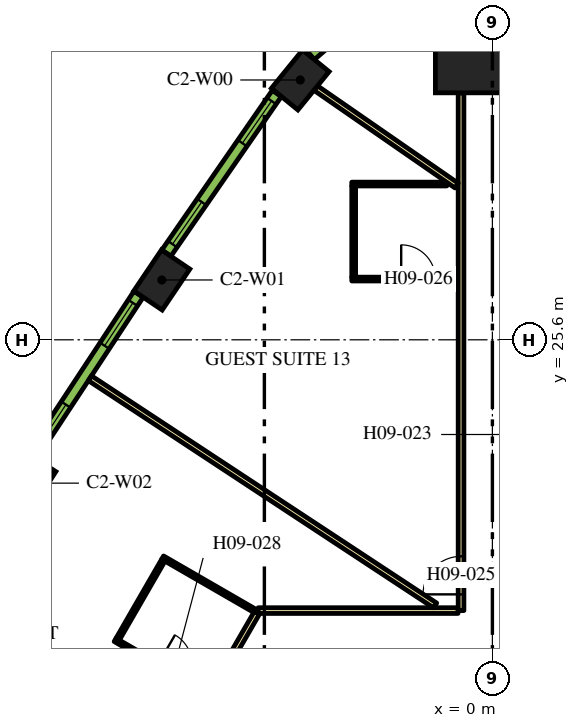
"""IFC4 building model, lengths in metres.
Left out: names, types, materials, properties, quantities, classifications, styles, units other than length and angle.
Written with IfcOpenShell. Run it as: python <this file> out.ifc"""

import sys

from ifc_helpers import new_model, si_unit, direction, frame, frame_2d, origin, origin_2d, place, context, subcontext, project, spatial, rectangle, extrude, element, fill, save


model = new_model("IFC4")
c1 = context("Model", 3, precision=1e-05, world=origin(), true_north=direction((0.0, 1.0)))
c2 = subcontext(c1, "Body", "Model", "MODEL_VIEW")
j1 = project(units=[si_unit("LENGTHUNIT", "METRE"), si_unit("PLANEANGLEUNIT", "RADIAN")], contexts=[c1])
p1 = place(None, origin())
s1 = spatial("IfcSite", under=j1, at=p1, CompositionType="ELEMENT")
p2 = place(p1, origin())
s2 = spatial("IfcBuilding", under=s1, at=p2, CompositionType="ELEMENT")
p3 = place(p2, frame((0.0, 0.0, 126.6)))
s3 = spatial("IfcBuildingStorey", under=s2, at=p3, CompositionType="ELEMENT", Elevation=126.6)
p4 = place(p3, frame((0.0, 33.598, 0.0), z_axis=(0.0, 0.0, 1.0), x_axis=(0.0, 1.0, 0.0)))
e1 = element("IfcColumn", 1, at=p4, inside=s3, PredefinedType="COLUMN", context=c2, shape_type="SweptSolid", body=[
    extrude(rectangle(XDim=3.0, YDim=3.0, at=origin_2d()), origin(), (0.0, 0.0, 1.0), 3.9),
])
for number, where, z_axis, x_axis in (
    (2, (-5.056, 32.437, 0.0), (0.0, 0.0, 1.0), (-0.632, -0.775, 0.0)),
    (3, (-8.699, 27.174, 0.0), (0.0, 0.0, 1.0), (-0.559, -0.829, 0.0)),
    (4, (-12.217, 21.828, 0.0), (0.0, 0.0, 1.0), (-0.54, -0.842, 0.0)),
):
    element("IfcColumn", number, at=place(p3, frame(where, z_axis=z_axis, x_axis=x_axis)), inside=s3, PredefinedType="COLUMN", context=c2, shape_type="SweptSolid", body=[
        extrude(rectangle(XDim=1.3, YDim=0.9, at=origin_2d()), origin(), (0.0, 0.0, 1.0), 3.9),
    ])
p5 = place(p3, frame((-0.825, 18.475, 0.0), z_axis=(0.0, 0.0, 1.0), x_axis=(0.0, 1.0, 0.0)))
e5 = element("IfcWall", 5, at=p5, inside=s3, PredefinedType="PARTITIONING", context=c2, shape_type="SweptSolid", body=[
    extrude(rectangle(XDim=13.623, YDim=0.15, at=frame_2d((6.812, 0.0))), origin(), (0.0, 0.0, 1.0), 2.75),
])
p6 = place(p5, frame((0.427, 0.0, 0.0)))
e6 = element("IfcOpeningElement", 6, at=p6, cuts=e5, PredefinedType="OPENING", context=c2, shape_type="SweptSolid", body=[
    extrude(rectangle(XDim=1.0, YDim=2.1, at=frame_2d((0.5, 1.05))), frame((0.0, 0.085, 0.0), z_axis=(0.0, -1.0, 0.0), x_axis=(1.0, 0.0, 0.0)), (0.0, 0.0, 1.0), 0.17),
])
p7 = place(p3, frame((-6.163, 18.475, 0.0), z_axis=(0.0, 0.0, 1.0), x_axis=(1.0, 0.0, 0.0)))
e7 = element("IfcWall", 7, at=p7, inside=s3, PredefinedType="PARTITIONING", context=c2, shape_type="SweptSolid", body=[
    extrude(rectangle(XDim=5.258, YDim=0.15, at=frame_2d((2.629, 0.0))), origin(), (0.0, 0.0, 1.0), 2.75),
])
p8 = place(p3, frame((-19.081, -3.9, 0.0), z_axis=(0.0, 0.0, 1.0), x_axis=(0.499998313975, 0.866026377209, 0.0)))
e8 = element("IfcWall", 8, at=p8, inside=s3, PredefinedType="PARTITIONING", context=c2, shape_type="SweptSolid", body=[
    extrude(rectangle(XDim=25.766, YDim=0.15, at=frame_2d((12.883, 0.0))), origin(), (0.0, 0.0, 1.0), 2.75),
])
p9 = place(p8, frame((19.306, 0.0, 0.0)))
e9 = element("IfcOpeningElement", 9, at=p9, cuts=e8, PredefinedType="OPENING", context=c2, shape_type="SweptSolid", body=[
    extrude(rectangle(XDim=1.0, YDim=2.1, at=frame_2d((0.5, 1.05))), frame((0.0, 0.085, 0.0), z_axis=(0.0, -1.0, 0.0), x_axis=(1.0, 0.0, 0.0)), (0.0, 0.0, 1.0), 0.17),
])
p10 = place(p8, frame((18.0, 0.0, 0.0)))
e10 = element("IfcOpeningElement", 10, at=p10, cuts=e8, PredefinedType="OPENING", context=c2, shape_type="SweptSolid", body=[
    extrude(rectangle(XDim=1.0, YDim=2.1, at=frame_2d((0.5, 1.05))), frame((0.0, 0.085, 0.0), z_axis=(0.0, -1.0, 0.0), x_axis=(1.0, 0.0, 0.0)), (0.0, 0.0, 1.0), 0.17),
])
p11 = place(p8, frame((7.793, 0.0, 0.0)))
e11 = element("IfcOpeningElement", 11, at=p11, cuts=e8, PredefinedType="OPENING", context=c2, shape_type="SweptSolid", body=[
    extrude(rectangle(XDim=0.9, YDim=2.1, at=frame_2d((0.45, 1.05))), frame((0.0, 0.085, 0.0), z_axis=(0.0, -1.0, 0.0), x_axis=(1.0, 0.0, 0.0)), (0.0, 0.0, 1.0), 0.17),
])
p12 = place(p8, frame((4.674, 0.0, 0.0)))
e12 = element("IfcOpeningElement", 12, at=p12, cuts=e8, PredefinedType="OPENING", context=c2, shape_type="SweptSolid", body=[
    extrude(rectangle(XDim=0.9, YDim=2.1, at=frame_2d((0.45, 1.05))), frame((0.0, 0.085, 0.0), z_axis=(0.0, -1.0, 0.0), x_axis=(1.0, 0.0, 0.0)), (0.0, 0.0, 1.0), 0.17),
])
p13 = place(p8, frame((0.18, 0.0, 0.0)))
e13 = element("IfcOpeningElement", 13, at=p13, cuts=e8, PredefinedType="OPENING", context=c2, shape_type="SweptSolid", body=[
    extrude(rectangle(XDim=1.0, YDim=2.1, at=frame_2d((0.5, 1.05))), frame((0.0, 0.085, 0.0), z_axis=(0.0, -1.0, 0.0), x_axis=(1.0, 0.0, 0.0)), (0.0, 0.0, 1.0), 0.17),
])
p14 = place(p3, frame((-10.592, 24.589, 0.0), z_axis=(0.0, 0.0, 1.0), x_axis=(0.835337323748, -0.549737715236, 0.0)))
e14 = element("IfcWall", 14, at=p14, inside=s3, PredefinedType="PARTITIONING", context=c2, shape_type="SweptSolid", body=[
    extrude(rectangle(XDim=10.875, YDim=0.15, at=frame_2d((5.438, 0.0))), origin(), (0.0, 0.0, 1.0), 2.75),
])
p15 = place(p3, frame((-4.649, 32.223, 0.0), z_axis=(0.0, 0.0, 1.0), x_axis=(0.822262349475, -0.569108626394, 0.0)))
e15 = element("IfcWall", 15, at=p15, inside=s3, PredefinedType="PARTITIONING", context=c2, shape_type="SweptSolid", body=[
    extrude(rectangle(XDim=4.51, YDim=0.15, at=frame_2d((2.255, 0.0))), origin(), (0.0, 0.0, 1.0), 2.75),
])
p16 = place(p3, frame((-3.7, 27.198, 0.0), z_axis=(0.0, 0.0, 1.0), x_axis=(1.0, 0.0, 0.0)))
e16 = element("IfcWall", 16, at=p16, inside=s3, PredefinedType="PARTITIONING", context=c2, shape_type="SweptSolid", body=[
    extrude(rectangle(XDim=2.8, YDim=0.1, at=frame_2d((1.4, 0.0))), origin(), (0.0, 0.0, 1.0), 2.75),
])
p17 = place(p16, frame((1.3, 0.0, 0.0)))
e17 = element("IfcOpeningElement", 17, at=p17, cuts=e16, PredefinedType="OPENING", context=c2, shape_type="SweptSolid", body=[
    extrude(rectangle(XDim=0.9, YDim=2.1, at=frame_2d((0.45, 1.05))), frame((0.0, 0.06, 0.0), z_axis=(0.0, -1.0, 0.0), x_axis=(1.0, 0.0, 0.0)), (0.0, 0.0, 1.0), 0.12),
])
p18 = place(p3, frame((-3.65, 27.248, 0.0), z_axis=(0.0, 0.0, 1.0), x_axis=(0.0, 1.0, 0.0)))
e18 = element("IfcWall", 18, at=p18, inside=s3, PredefinedType="PARTITIONING", context=c2, shape_type="SweptSolid", body=[
    extrude(rectangle(XDim=2.4, YDim=0.1, at=frame_2d((1.2, 0.0))), origin(), (0.0, 0.0, 1.0), 2.75),
])
p19 = place(p3, frame((-1.2, 29.698, 0.0), z_axis=(0.0, 0.0, 1.0), x_axis=(-1.0, 0.0, 0.0)))
e19 = element("IfcWall", 19, at=p19, inside=s3, PredefinedType="PARTITIONING", context=c2, shape_type="SweptSolid", body=[
    extrude(rectangle(XDim=2.5, YDim=0.1, at=frame_2d((1.25, 0.0))), origin(), (0.0, 0.0, 1.0), 2.75),
])
p20 = place(p3, frame((-9.928, 17.704, 0.0), z_axis=(0.0, 0.0, 1.0), x_axis=(0.866034573852, -0.49998411664, 0.0)))
e20 = element("IfcWall", 20, at=p20, inside=s3, PredefinedType="PARTITIONING", context=c2, shape_type="SweptSolid", body=[
    extrude(rectangle(XDim=2.8, YDim=0.1, at=frame_2d((1.4, 0.0))), origin(), (0.0, 0.0, 1.0), 2.75),
])
p21 = place(p20, frame((1.3, 0.0, 0.0)))
e21 = element("IfcOpeningElement", 21, at=p21, cuts=e20, PredefinedType="OPENING", context=c2, shape_type="SweptSolid", body=[
    extrude(rectangle(XDim=0.9, YDim=2.1, at=frame_2d((0.45, 1.05))), frame((0.0, 0.06, 0.0), z_axis=(0.0, -1.0, 0.0), x_axis=(1.0, 0.0, 0.0)), (0.0, 0.0, 1.0), 0.12),
])
p22 = place(p3, frame((-9.86, 17.722, 0.0), z_axis=(0.0, 0.0, 1.0), x_axis=(0.500001309137, 0.866024647952, 0.0)))
e22 = element("IfcWall", 22, at=p22, inside=s3, PredefinedType="PARTITIONING", context=c2, shape_type="SweptSolid", body=[
    extrude(rectangle(XDim=2.4, YDim=0.1, at=frame_2d((1.2, 0.0))), origin(), (0.0, 0.0, 1.0), 2.75),
])
p23 = place(p3, frame((-6.253, 18.469, 0.0), z_axis=(0.0, 0.0, 1.0), x_axis=(-0.866034573852, 0.49998411664, 0.0)))
e23 = element("IfcWall", 23, at=p23, inside=s3, PredefinedType="PARTITIONING", context=c2, shape_type="SweptSolid", body=[
    extrude(rectangle(XDim=2.8, YDim=0.1, at=frame_2d((1.4, 0.0))), origin(), (0.0, 0.0, 1.0), 2.75),
])
p24 = place(p3, frame((-3.405, 34.275, 0.0), z_axis=(0.0, 0.0, 1.0), x_axis=(-0.754882764627, -0.655859749999, 0.0)))
e24 = element("IfcWall", 24, at=p24, inside=s3, PredefinedType="SOLIDWALL", context=c2, shape_type="SweptSolid", body=[
    extrude(rectangle(XDim=1.82, YDim=0.29, at=frame_2d((0.91, 0.0))), origin(), (0.0, 0.0, 1.0), 3.65),
])
p25 = place(p24, frame((0.46, 0.0, 0.9)))
e25 = element("IfcOpeningElement", 25, at=p25, cuts=e24, PredefinedType="OPENING", context=c2, shape_type="SweptSolid", body=[
    extrude(rectangle(XDim=0.9, YDim=2.15, at=frame_2d((0.45, 1.075))), frame((0.0, 0.155, 0.0), z_axis=(0.0, -1.0, 0.0), x_axis=(1.0, 0.0, 0.0)), (0.0, 0.0, 1.0), 0.31),
])
p26 = place(p3, frame((-5.673, 32.081, 0.0), z_axis=(0.0, 0.0, 1.0), x_axis=(-0.569113019126, -0.822259309136, 0.0)))
e26 = element("IfcWall", 26, at=p26, inside=s3, PredefinedType="SOLIDWALL", context=c2, shape_type="SweptSolid", body=[
    extrude(rectangle(XDim=5.107, YDim=0.29, at=frame_2d((2.553, 0.0))), origin(), (0.0, 0.0, 1.0), 3.65),
])
p27 = place(p26, frame((0.24, 0.0, 0.9)))
e27 = element("IfcOpeningElement", 27, at=p27, cuts=e26, PredefinedType="OPENING", context=c2, shape_type="SweptSolid", body=[
    extrude(rectangle(XDim=1.35, YDim=2.15, at=frame_2d((0.675, 1.075))), frame((0.0, 0.155, 0.0), z_axis=(0.0, -1.0, 0.0), x_axis=(1.0, 0.0, 0.0)), (0.0, 0.0, 1.0), 0.31),
])
p28 = place(p26, frame((3.471, 0.0, 0.9)))
e28 = element("IfcOpeningElement", 28, at=p28, cuts=e26, PredefinedType="OPENING", context=c2, shape_type="SweptSolid", body=[
    extrude(rectangle(XDim=1.35, YDim=2.15, at=frame_2d((0.675, 1.075))), frame((0.0, 0.155, 0.0), z_axis=(0.0, -1.0, 0.0), x_axis=(1.0, 0.0, 0.0)), (0.0, 0.0, 1.0), 0.31),
])
p29 = place(p3, frame((-9.311, 26.799, 0.0), z_axis=(0.0, 0.0, 1.0), x_axis=(-0.549741341923, -0.835334937005, 0.0)))
e29 = element("IfcWall", 29, at=p29, inside=s3, PredefinedType="SOLIDWALL", context=c2, shape_type="SweptSolid", body=[
    extrude(rectangle(XDim=5.1, YDim=0.29, at=frame_2d((2.55, 0.0))), origin(), (0.0, 0.0, 1.0), 3.65),
])
p30 = place(p29, frame((0.273, 0.0, 0.9)))
e30 = element("IfcOpeningElement", 30, at=p30, cuts=e29, PredefinedType="OPENING", context=c2, shape_type="SweptSolid", body=[
    extrude(rectangle(XDim=1.35, YDim=2.15, at=frame_2d((0.675, 1.075))), frame((0.0, 0.155, 0.0), z_axis=(0.0, -1.0, 0.0), x_axis=(1.0, 0.0, 0.0)), (0.0, 0.0, 1.0), 0.31),
])
p31 = place(p29, frame((3.478, 0.0, 0.9)))
e31 = element("IfcOpeningElement", 31, at=p31, cuts=e29, PredefinedType="OPENING", context=c2, shape_type="SweptSolid", body=[
    extrude(rectangle(XDim=1.35, YDim=2.15, at=frame_2d((0.675, 1.075))), frame((0.0, 0.155, 0.0), z_axis=(0.0, -1.0, 0.0), x_axis=(1.0, 0.0, 0.0)), (0.0, 0.0, 1.0), 0.31),
])
p32 = place(p6, origin())
e32 = element("IfcDoor", 32, at=p32, inside=s3, OperationType="SINGLE_SWING_LEFT", PredefinedType="DOOR", context=c2, shape_type="SweptSolid", body=[
    extrude(rectangle(XDim=1.0, YDim=2.1, at=frame_2d((0.5, 1.05))), frame((0.0, 0.025, 0.0), z_axis=(0.0, -1.0, 0.0), x_axis=(1.0, 0.0, 0.0)), (0.0, 0.0, 1.0), 0.05),
])
fill(e6, e32)
p33 = place(p17, origin())
e33 = element("IfcDoor", 33, at=p33, inside=s3, OperationType="SINGLE_SWING_LEFT", PredefinedType="DOOR", context=c2, shape_type="SweptSolid", body=[
    extrude(rectangle(XDim=0.9, YDim=2.1, at=frame_2d((0.45, 1.05))), frame((0.0, 0.025, 0.0), z_axis=(0.0, -1.0, 0.0), x_axis=(1.0, 0.0, 0.0)), (0.0, 0.0, 1.0), 0.05),
])
fill(e17, e33)
p34 = place(p27, origin())
e34 = element("IfcWindow", 34, at=p34, inside=s3, PartitioningType="DOUBLE_PANEL_VERTICAL", PredefinedType="WINDOW", context=c2, shape_type="SweptSolid", body=[
    extrude(rectangle(XDim=1.35, YDim=2.15, at=frame_2d((0.675, 1.075))), frame((0.0, 0.015, 0.0), z_axis=(0.0, -1.0, 0.0), x_axis=(1.0, 0.0, 0.0)), (0.0, 0.0, 1.0), 0.06),
])
fill(e27, e34)
p35 = place(p28, origin())
e35 = element("IfcWindow", 35, at=p35, inside=s3, PartitioningType="DOUBLE_PANEL_VERTICAL", PredefinedType="WINDOW", context=c2, shape_type="SweptSolid", body=[
    extrude(rectangle(XDim=1.35, YDim=2.15, at=frame_2d((0.675, 1.075))), frame((0.0, 0.015, 0.0), z_axis=(0.0, -1.0, 0.0), x_axis=(1.0, 0.0, 0.0)), (0.0, 0.0, 1.0), 0.06),
])
fill(e28, e35)
p36 = place(p30, origin())
e36 = element("IfcWindow", 36, at=p36, inside=s3, PartitioningType="DOUBLE_PANEL_VERTICAL", PredefinedType="WINDOW", context=c2, shape_type="SweptSolid", body=[
    extrude(rectangle(XDim=1.35, YDim=2.15, at=frame_2d((0.675, 1.075))), frame((0.0, 0.015, 0.0), z_axis=(0.0, -1.0, 0.0), x_axis=(1.0, 0.0, 0.0)), (0.0, 0.0, 1.0), 0.06),
])
fill(e30, e36)
p37 = place(p31, origin())
e37 = element("IfcWindow", 37, at=p37, inside=s3, PartitioningType="DOUBLE_PANEL_VERTICAL", PredefinedType="WINDOW", context=c2, shape_type="SweptSolid", body=[
    extrude(rectangle(XDim=1.35, YDim=2.15, at=frame_2d((0.675, 1.075))), frame((0.0, 0.015, 0.0), z_axis=(0.0, -1.0, 0.0), x_axis=(1.0, 0.0, 0.0)), (0.0, 0.0, 1.0), 0.06),
])
fill(e31, e37)
save(model, sys.argv[1])
